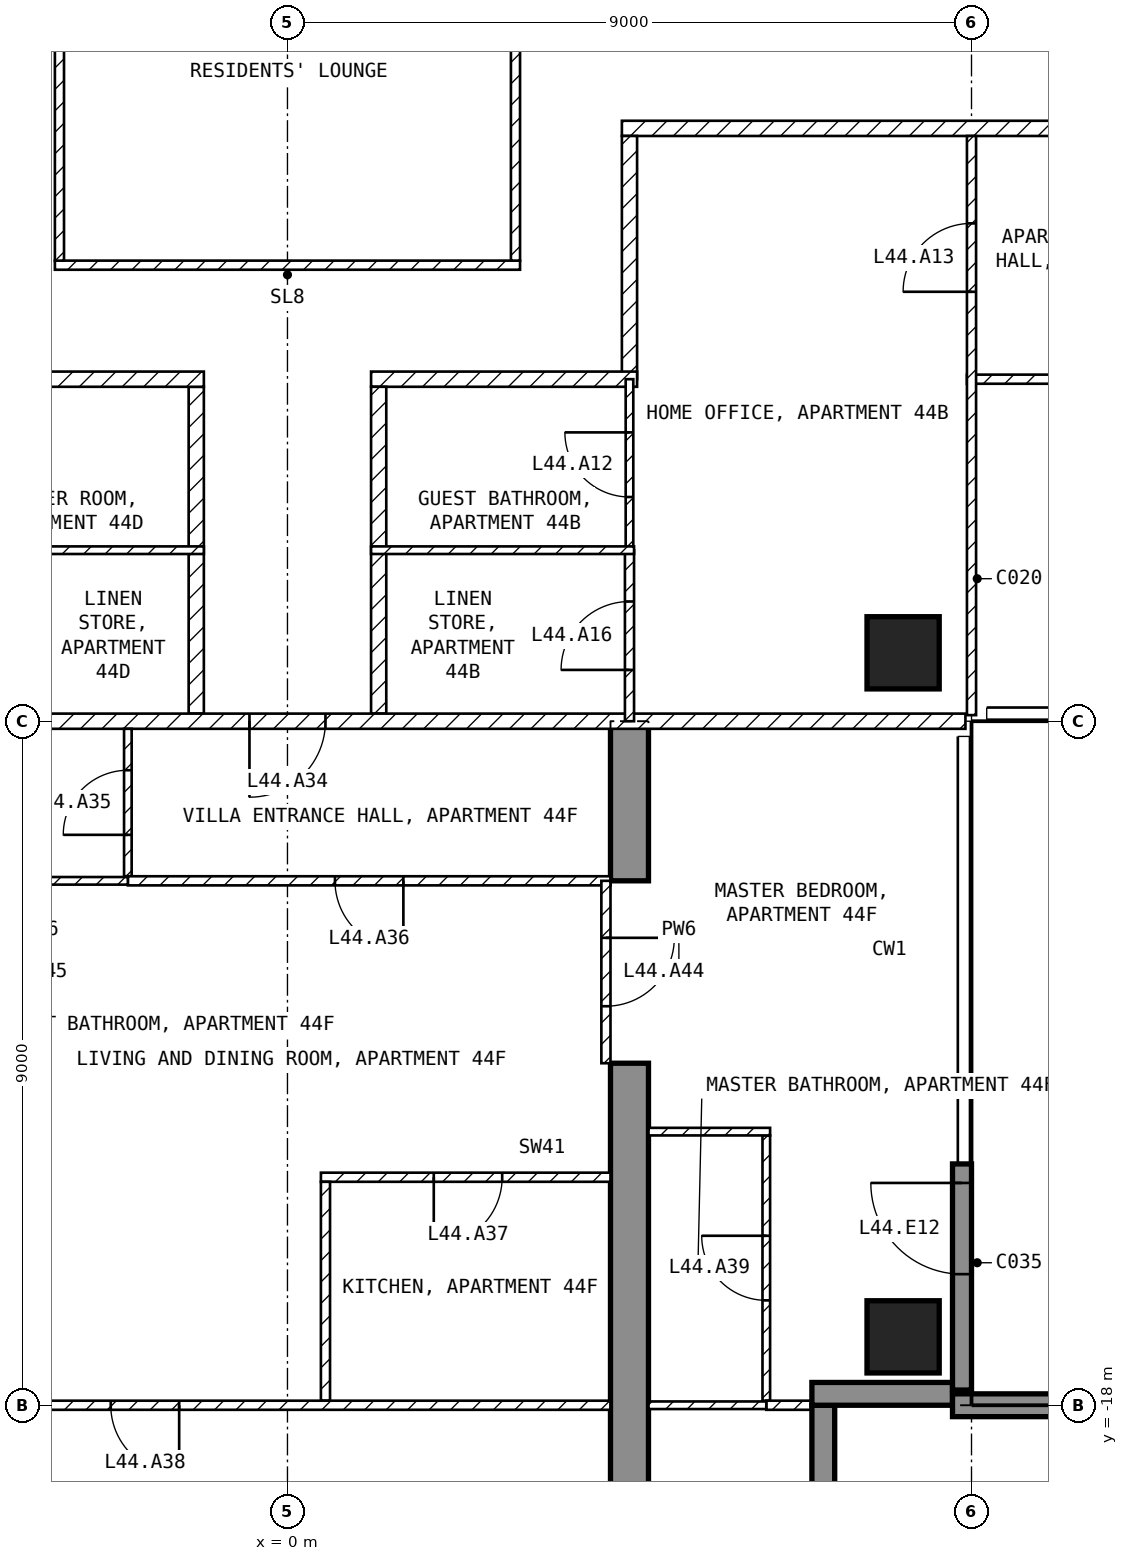
"""IFC4 building model, lengths in metres.
Left out: names, types, materials, properties, quantities, classifications, styles, units other than length and angle.
Written with IfcOpenShell. Run it as: python <this file> out.ifc"""

import sys

from ifc_helpers import new_model, si_unit, direction, frame, frame_2d, origin, origin_2d, place, context, subcontext, project, spatial, polyline, rectangle, outline, extrude, element, fill, save


model = new_model("IFC4")
c1 = context("Model", 3, precision=1e-05, world=origin(), true_north=direction((0.0, 1.0)))
c2 = subcontext(c1, "Body", "Model", "MODEL_VIEW")
j1 = project(units=[si_unit("LENGTHUNIT", "METRE"), si_unit("PLANEANGLEUNIT", "RADIAN")], contexts=[c1])
p1 = place(None, origin())
s1 = spatial("IfcSite", under=j1, at=p1, CompositionType="ELEMENT")
p2 = place(p1, origin())
s2 = spatial("IfcBuilding", under=s1, at=p2, CompositionType="ELEMENT")
p3 = place(p2, frame((0.0, 0.0, 180.6)))
s3 = spatial("IfcBuildingStorey", under=s2, at=p3, CompositionType="ELEMENT", Elevation=180.6)
for number, where, z_axis, x_axis in (
    (1, (8.1, -17.1, -0.25), (0.0, 0.0, 1.0), (1.0, 0.0, 0.0)),
    (2, (8.1, -8.1, -0.25), (0.0, 0.0, 1.0), (1.0, 0.0, 0.0)),
):
    element("IfcColumn", number, at=place(p3, frame(where, z_axis=z_axis, x_axis=x_axis)), inside=s3, PredefinedType="COLUMN", context=c2, shape_type="SweptSolid", body=[
        extrude(rectangle(XDim=0.95, YDim=0.95, at=origin_2d()), origin(), (0.0, 0.0, 1.0), 3.5),
    ])
p4 = place(p3, frame((4.25, -20.225, -0.25), z_axis=(1.0, 0.0, 0.0), x_axis=(0.0, 1.0, 0.0)))
e3 = element("IfcWall", 3, at=p4, inside=s3, PredefinedType="SHEAR", context=c2, shape_type="SweptSolid", body=[
    extrude(outline(polyline([(0.0, 0.0), (6.725, 0.0), (6.725, 2.65), (9.125, 2.65), (9.125, 0.0), (11.225, 0.0), (11.225, 3.5), (0.0, 3.5), (0.0, 0.0)])), origin(), (0.0, 0.0, 1.0), 0.5),
])
p5 = place(p3, frame((8.875, -17.8, 0.0), z_axis=(0.0, 0.0, 1.0), x_axis=(0.0, 1.0, 0.0)))
e4 = element("IfcWall", 4, at=p5, inside=s3, PredefinedType="SOLIDWALL", context=c2, shape_type="SweptSolid", body=[
    extrude(rectangle(XDim=2.975, YDim=0.25, at=frame_2d((1.488, 0.0))), origin(), (0.0, 0.0, 1.0), 3.25),
])
p6 = place(p5, frame((1.525, 0.0, 0.0)))
e5 = element("IfcOpeningElement", 5, at=p6, cuts=e4, PredefinedType="OPENING", context=c2, shape_type="SweptSolid", body=[
    extrude(rectangle(XDim=1.2, YDim=2.4, at=frame_2d((0.6, 1.2))), frame((0.0, 0.135, 0.0), z_axis=(0.0, -1.0, 0.0), x_axis=(1.0, 0.0, 0.0)), (0.0, 0.0, 1.0), 0.27),
])
p7 = place(p3, frame((7.05, -19.8, 0.0), z_axis=(0.0, 0.0, 1.0), x_axis=(0.0, 1.0, 0.0)))
e6 = element("IfcWall", 6, at=p7, inside=s3, PredefinedType="SOLIDWALL", context=c2, shape_type="SweptSolid", body=[
    extrude(rectangle(XDim=1.8, YDim=0.3, at=frame_2d((0.9, 0.0))), origin(), (0.0, 0.0, 1.0), 3.25),
])
p8 = place(p3, frame((6.9, -17.85, 0.0), z_axis=(0.0, 0.0, 1.0), x_axis=(1.0, 0.0, 0.0)))
e7 = element("IfcWall", 7, at=p8, inside=s3, PredefinedType="SOLIDWALL", context=c2, shape_type="SweptSolid", body=[
    extrude(rectangle(XDim=1.85, YDim=0.3, at=frame_2d((0.925, 0.0))), origin(), (0.0, 0.0, 1.0), 3.25),
])
p9 = place(p3, frame((8.75, -18.0, 0.0), z_axis=(0.0, 0.0, 1.0), x_axis=(1.0, 0.0, 0.0)))
e8 = element("IfcWall", 8, at=p9, inside=s3, PredefinedType="SOLIDWALL", context=c2, shape_type="SweptSolid", body=[
    extrude(rectangle(XDim=2.95, YDim=0.3, at=frame_2d((1.475, 0.0))), origin(), (0.0, 0.0, 1.0), 3.25),
])
p10 = place(p3, frame((-3.06, -3.0, 0.0), z_axis=(0.0, 0.0, 1.0), x_axis=(1.0, 0.0, 0.0)))
e9 = element("IfcWall", 9, at=p10, inside=s3, PredefinedType="PARTITIONING", context=c2, shape_type="SweptSolid", body=[
    extrude(rectangle(XDim=6.12, YDim=0.12, at=frame_2d((3.06, 0.0))), origin(), (0.0, 0.0, 1.0), 3.25),
])
for number, where, z_axis, x_axis in (
    (10, (3.0, -2.94, 0.0), (0.0, 0.0, 1.0), (0.0, 1.0, 0.0)),
    (11, (-3.0, 2.94, 0.0), (0.0, 0.0, 1.0), (0.0, -1.0, 0.0)),
):
    element("IfcWall", number, at=place(p3, frame(where, z_axis=z_axis, x_axis=x_axis)), inside=s3, PredefinedType="PARTITIONING", context=c2, shape_type="SweptSolid", body=[
        extrude(rectangle(XDim=5.88, YDim=0.12, at=frame_2d((2.94, 0.0))), origin(), (0.0, 0.0, 1.0), 3.25),
    ])
p11 = place(p3, frame((21.6, -1.2, 0.0), z_axis=(0.0, 0.0, 1.0), x_axis=(-1.0, 0.0, 0.0)))
e12 = element("IfcWall", 12, at=p11, inside=s3, PredefinedType="PARTITIONING", context=c2, shape_type="SweptSolid", body=[
    extrude(rectangle(XDim=17.2, YDim=0.2, at=frame_2d((8.6, 0.0))), origin(), (0.0, 0.0, 1.0), 3.25),
])
p12 = place(p11, frame((10.3, 0.0, 0.0)))
e13 = element("IfcOpeningElement", 13, at=p12, cuts=e12, PredefinedType="OPENING", context=c2, shape_type="SweptSolid", body=[
    extrude(rectangle(XDim=1.0, YDim=2.1, at=frame_2d((0.5, 1.05))), frame((0.0, 0.11, 0.0), z_axis=(0.0, -1.0, 0.0), x_axis=(1.0, 0.0, 0.0)), (0.0, 0.0, 1.0), 0.22),
])
p13 = place(p3, frame((4.5, -1.3, 0.0), z_axis=(0.0, 0.0, 1.0), x_axis=(0.0, -1.0, 0.0)))
e14 = element("IfcWall", 14, at=p13, inside=s3, PredefinedType="PARTITIONING", context=c2, shape_type="SweptSolid", body=[
    extrude(rectangle(XDim=3.2, YDim=0.2, at=frame_2d((1.6, 0.0))), origin(), (0.0, 0.0, 1.0), 3.25),
])
p14 = place(p3, frame((4.6, -4.5, 0.0), z_axis=(0.0, 0.0, 1.0), x_axis=(-1.0, 0.0, 0.0)))
e15 = element("IfcWall", 15, at=p14, inside=s3, PredefinedType="PARTITIONING", context=c2, shape_type="SweptSolid", body=[
    extrude(rectangle(XDim=3.5, YDim=0.2, at=frame_2d((1.75, 0.0))), origin(), (0.0, 0.0, 1.0), 3.25),
])
for number, where, z_axis, x_axis in (
    (16, (1.2, -4.6, 0.0), (0.0, 0.0, 1.0), (0.0, -1.0, 0.0)),
    (17, (-1.2, -8.9, 0.0), (0.0, 0.0, 1.0), (0.0, 1.0, 0.0)),
):
    element("IfcWall", number, at=place(p3, frame(where, z_axis=z_axis, x_axis=x_axis)), inside=s3, PredefinedType="PARTITIONING", context=c2, shape_type="SweptSolid", body=[
        extrude(rectangle(XDim=4.3, YDim=0.2, at=frame_2d((2.15, 0.0))), origin(), (0.0, 0.0, 1.0), 3.25),
    ])
p15 = place(p3, frame((-1.1, -4.5, 0.0), z_axis=(0.0, 0.0, 1.0), x_axis=(-1.0, 0.0, 0.0)))
e18 = element("IfcWall", 18, at=p15, inside=s3, PredefinedType="PARTITIONING", context=c2, shape_type="SweptSolid", body=[
    extrude(rectangle(XDim=3.5, YDim=0.2, at=frame_2d((1.75, 0.0))), origin(), (0.0, 0.0, 1.0), 3.25),
])
p16 = place(p3, frame((8.92, -9.0, 0.0), z_axis=(0.0, 0.0, 1.0), x_axis=(-1.0, 0.0, 0.0)))
e19 = element("IfcWall", 19, at=p16, inside=s3, PredefinedType="PARTITIONING", context=c2, shape_type="SweptSolid", body=[
    extrude(rectangle(XDim=17.84, YDim=0.2, at=frame_2d((8.92, 0.0))), origin(), (0.0, 0.0, 1.0), 3.25),
])
p17 = place(p16, frame((8.42, 0.0, 0.0)))
e20 = element("IfcOpeningElement", 20, at=p17, cuts=e19, PredefinedType="OPENING", context=c2, shape_type="SweptSolid", body=[
    extrude(rectangle(XDim=1.0, YDim=2.1, at=frame_2d((0.5, 1.05))), frame((0.0, 0.11, 0.0), z_axis=(0.0, -1.0, 0.0), x_axis=(1.0, 0.0, 0.0)), (0.0, 0.0, 1.0), 0.22),
])
p18 = place(p3, frame((17.4, -4.5, 0.0), z_axis=(0.0, 0.0, 1.0), x_axis=(-1.0, 0.0, 0.0)))
e21 = element("IfcWall", 21, at=p18, inside=s3, PredefinedType="PARTITIONING", context=c2, shape_type="SweptSolid", body=[
    extrude(rectangle(XDim=8.46, YDim=0.12, at=frame_2d((4.23, 0.0))), origin(), (0.0, 0.0, 1.0), 3.25),
])
p19 = place(p18, frame((0.45, 0.0, 0.0)))
e22 = element("IfcOpeningElement", 22, at=p19, cuts=e21, PredefinedType="OPENING", context=c2, shape_type="SweptSolid", body=[
    extrude(rectangle(XDim=0.9, YDim=2.1, at=frame_2d((0.45, 1.05))), frame((0.0, 0.07, 0.0), z_axis=(0.0, -1.0, 0.0), x_axis=(1.0, 0.0, 0.0)), (0.0, 0.0, 1.0), 0.14),
])
p20 = place(p18, frame((6.15, 0.0, 0.0)))
e23 = element("IfcOpeningElement", 23, at=p20, cuts=e21, PredefinedType="OPENING", context=c2, shape_type="SweptSolid", body=[
    extrude(rectangle(XDim=0.9, YDim=2.1, at=frame_2d((0.45, 1.05))), frame((0.0, 0.07, 0.0), z_axis=(0.0, -1.0, 0.0), x_axis=(1.0, 0.0, 0.0)), (0.0, 0.0, 1.0), 0.14),
])
p21 = place(p3, frame((9.0, -8.92, 0.0), z_axis=(0.0, 0.0, 1.0), x_axis=(0.0, 1.0, 0.0)))
e24 = element("IfcWall", 24, at=p21, inside=s3, PredefinedType="PARTITIONING", context=c2, shape_type="SweptSolid", body=[
    extrude(rectangle(XDim=7.62, YDim=0.12, at=frame_2d((3.81, 0.0))), origin(), (0.0, 0.0, 1.0), 3.25),
])
p22 = place(p21, frame((5.57, 0.0, 0.0)))
e25 = element("IfcOpeningElement", 25, at=p22, cuts=e24, PredefinedType="OPENING", context=c2, shape_type="SweptSolid", body=[
    extrude(rectangle(XDim=0.9, YDim=2.1, at=frame_2d((0.45, 1.05))), frame((0.0, 0.07, 0.0), z_axis=(0.0, -1.0, 0.0), x_axis=(1.0, 0.0, 0.0)), (0.0, 0.0, 1.0), 0.14),
])
p23 = place(p3, frame((4.5, -6.75, 0.0), z_axis=(0.0, 0.0, 1.0), x_axis=(0.0, 1.0, 0.0)))
e26 = element("IfcWall", 26, at=p23, inside=s3, PredefinedType="PARTITIONING", context=c2, shape_type="SweptSolid", body=[
    extrude(rectangle(XDim=2.25, YDim=0.1, at=frame_2d((1.125, 0.0))), origin(), (0.0, 0.0, 1.0), 3.25),
])
p24 = place(p23, frame((0.7, 0.0, 0.0)))
e27 = element("IfcOpeningElement", 27, at=p24, cuts=e26, PredefinedType="OPENING", context=c2, shape_type="SweptSolid", body=[
    extrude(rectangle(XDim=0.85, YDim=2.1, at=frame_2d((0.425, 1.05))), frame((0.0, 0.06, 0.0), z_axis=(0.0, -1.0, 0.0), x_axis=(1.0, 0.0, 0.0)), (0.0, 0.0, 1.0), 0.12),
])
p25 = place(p3, frame((4.5, -9.0, 0.0), z_axis=(0.0, 0.0, 1.0), x_axis=(0.0, 1.0, 0.0)))
e28 = element("IfcWall", 28, at=p25, inside=s3, PredefinedType="PARTITIONING", context=c2, shape_type="SweptSolid", body=[
    extrude(rectangle(XDim=2.25, YDim=0.12, at=frame_2d((1.125, 0.0))), origin(), (0.0, 0.0, 1.0), 3.25),
])
p26 = place(p25, frame((0.675, 0.0, 0.0)))
e29 = element("IfcOpeningElement", 29, at=p26, cuts=e28, PredefinedType="OPENING", context=c2, shape_type="SweptSolid", body=[
    extrude(rectangle(XDim=0.9, YDim=2.1, at=frame_2d((0.45, 1.05))), frame((0.0, 0.07, 0.0), z_axis=(0.0, -1.0, 0.0), x_axis=(1.0, 0.0, 0.0)), (0.0, 0.0, 1.0), 0.14),
])
for number, where, z_axis, x_axis in (
    (30, (4.56, -6.75, 0.0), (0.0, 0.0, 1.0), (-1.0, 0.0, 0.0)),
    (31, (-1.1, -6.75, 0.0), (0.0, 0.0, 1.0), (-1.0, 0.0, 0.0)),
):
    element("IfcWall", number, at=place(p3, frame(where, z_axis=z_axis, x_axis=x_axis)), inside=s3, PredefinedType="PARTITIONING", context=c2, shape_type="SweptSolid", body=[
        extrude(rectangle(XDim=3.46, YDim=0.1, at=frame_2d((1.73, 0.0))), origin(), (0.0, 0.0, 1.0), 3.25),
    ])
p27 = place(p3, frame((-2.1, -11.04, 0.0), z_axis=(0.0, 0.0, 1.0), x_axis=(0.0, 1.0, 0.0)))
e32 = element("IfcWall", 32, at=p27, inside=s3, PredefinedType="PARTITIONING", context=c2, shape_type="SweptSolid", body=[
    extrude(rectangle(XDim=1.94, YDim=0.1, at=frame_2d((0.97, 0.0))), origin(), (0.0, 0.0, 1.0), 3.25),
])
p28 = place(p27, frame((0.545, 0.0, 0.0)))
e33 = element("IfcOpeningElement", 33, at=p28, cuts=e32, PredefinedType="OPENING", context=c2, shape_type="SweptSolid", body=[
    extrude(rectangle(XDim=0.85, YDim=2.1, at=frame_2d((0.425, 1.05))), frame((0.0, 0.06, 0.0), z_axis=(0.0, -1.0, 0.0), x_axis=(1.0, 0.0, 0.0)), (0.0, 0.0, 1.0), 0.12),
])
p29 = place(p3, frame((4.25, -11.1, 0.0), z_axis=(0.0, 0.0, 1.0), x_axis=(-1.0, 0.0, 0.0)))
e34 = element("IfcWall", 34, at=p29, inside=s3, PredefinedType="PARTITIONING", context=c2, shape_type="SweptSolid", body=[
    extrude(rectangle(XDim=6.35, YDim=0.12, at=frame_2d((3.175, 0.0))), origin(), (0.0, 0.0, 1.0), 3.25),
])
p30 = place(p29, frame((2.725, 0.0, 0.0)))
e35 = element("IfcOpeningElement", 35, at=p30, cuts=e34, PredefinedType="OPENING", context=c2, shape_type="SweptSolid", body=[
    extrude(rectangle(XDim=0.9, YDim=2.1, at=frame_2d((0.45, 1.05))), frame((0.0, 0.07, 0.0), z_axis=(0.0, -1.0, 0.0), x_axis=(1.0, 0.0, 0.0)), (0.0, 0.0, 1.0), 0.14),
])
p31 = place(p3, frame((-2.1, -11.1, 0.0), z_axis=(0.0, 0.0, 1.0), x_axis=(-1.0, 0.0, 0.0)))
e36 = element("IfcWall", 36, at=p31, inside=s3, PredefinedType="PARTITIONING", context=c2, shape_type="SweptSolid", body=[
    extrude(rectangle(XDim=2.15, YDim=0.1, at=frame_2d((1.075, 0.0))), origin(), (0.0, 0.0, 1.0), 3.25),
])
p32 = place(p3, frame((4.25, -15.0, 0.0), z_axis=(0.0, 0.0, 1.0), x_axis=(-1.0, 0.0, 0.0)))
e37 = element("IfcWall", 37, at=p32, inside=s3, PredefinedType="PARTITIONING", context=c2, shape_type="SweptSolid", body=[
    extrude(rectangle(XDim=3.81, YDim=0.12, at=frame_2d((1.905, 0.0))), origin(), (0.0, 0.0, 1.0), 3.25),
])
p33 = place(p32, frame((1.425, 0.0, 0.0)))
e38 = element("IfcOpeningElement", 38, at=p33, cuts=e37, PredefinedType="OPENING", context=c2, shape_type="SweptSolid", body=[
    extrude(rectangle(XDim=0.9, YDim=2.1, at=frame_2d((0.45, 1.05))), frame((0.0, 0.07, 0.0), z_axis=(0.0, -1.0, 0.0), x_axis=(1.0, 0.0, 0.0)), (0.0, 0.0, 1.0), 0.14),
])
p34 = place(p3, frame((0.5, -15.06, 0.0), z_axis=(0.0, 0.0, 1.0), x_axis=(0.0, -1.0, 0.0)))
e39 = element("IfcWall", 39, at=p34, inside=s3, PredefinedType="PARTITIONING", context=c2, shape_type="SweptSolid", body=[
    extrude(rectangle(XDim=2.88, YDim=0.12, at=frame_2d((1.44, 0.0))), origin(), (0.0, 0.0, 1.0), 3.25),
])
p35 = place(p3, frame((4.25, -18.0, 0.0), z_axis=(0.0, 0.0, 1.0), x_axis=(-1.0, 0.0, 0.0)))
e40 = element("IfcWall", 40, at=p35, inside=s3, PredefinedType="PARTITIONING", context=c2, shape_type="SweptSolid", body=[
    extrude(rectangle(XDim=8.5, YDim=0.12, at=frame_2d((4.25, 0.0))), origin(), (0.0, 0.0, 1.0), 3.25),
])
p36 = place(p35, frame((5.675, 0.0, 0.0)))
e41 = element("IfcOpeningElement", 41, at=p36, cuts=e40, PredefinedType="OPENING", context=c2, shape_type="SweptSolid", body=[
    extrude(rectangle(XDim=0.9, YDim=2.1, at=frame_2d((0.45, 1.05))), frame((0.0, 0.07, 0.0), z_axis=(0.0, -1.0, 0.0), x_axis=(1.0, 0.0, 0.0)), (0.0, 0.0, 1.0), 0.14),
])
p37 = place(p3, frame((6.3, -17.94, 0.0), z_axis=(0.0, 0.0, 1.0), x_axis=(0.0, 1.0, 0.0)))
e42 = element("IfcWall", 42, at=p37, inside=s3, PredefinedType="PARTITIONING", context=c2, shape_type="SweptSolid", body=[
    extrude(rectangle(XDim=3.49, YDim=0.1, at=frame_2d((1.745, 0.0))), origin(), (0.0, 0.0, 1.0), 3.25),
])
p38 = place(p37, frame((1.32, 0.0, 0.0)))
e43 = element("IfcOpeningElement", 43, at=p38, cuts=e42, PredefinedType="OPENING", context=c2, shape_type="SweptSolid", body=[
    extrude(rectangle(XDim=0.85, YDim=2.1, at=frame_2d((0.425, 1.05))), frame((0.0, 0.06, 0.0), z_axis=(0.0, -1.0, 0.0), x_axis=(1.0, 0.0, 0.0)), (0.0, 0.0, 1.0), 0.12),
])
p39 = place(p3, frame((6.35, -14.4, 0.0), z_axis=(0.0, 0.0, 1.0), x_axis=(-1.0, 0.0, 0.0)))
e44 = element("IfcWall", 44, at=p39, inside=s3, PredefinedType="PARTITIONING", context=c2, shape_type="SweptSolid", body=[
    extrude(rectangle(XDim=1.6, YDim=0.1, at=frame_2d((0.8, 0.0))), origin(), (0.0, 0.0, 1.0), 3.25),
])
p40 = place(p3, frame((7.12, -18.0, 0.0), z_axis=(0.0, 0.0, 1.0), x_axis=(-1.0, 0.0, 0.0)))
e45 = element("IfcWall", 45, at=p40, inside=s3, PredefinedType="PARTITIONING", context=c2, shape_type="SweptSolid", body=[
    extrude(rectangle(XDim=0.82, YDim=0.12, at=frame_2d((0.41, 0.0))), origin(), (0.0, 0.0, 1.0), 3.25),
])
p41 = place(p3, frame((6.3, -18.0, 0.0), z_axis=(0.0, 0.0, 1.0), x_axis=(-1.0, 0.0, 0.0)))
e46 = element("IfcWall", 46, at=p41, inside=s3, PredefinedType="PARTITIONING", context=c2, shape_type="SweptSolid", body=[
    extrude(rectangle(XDim=1.55, YDim=0.1, at=frame_2d((0.775, 0.0))), origin(), (0.0, 0.0, 1.0), 3.25),
])
p42 = place(p3, frame((4.19, -11.1, 0.0), z_axis=(0.0, 0.0, 1.0), x_axis=(0.0, -1.0, 0.0)))
e47 = element("IfcWall", 47, at=p42, inside=s3, PredefinedType="PARTITIONING", context=c2, shape_type="SweptSolid", body=[
    extrude(rectangle(XDim=2.4, YDim=0.12, at=frame_2d((1.2, 0.0))), origin(), (0.0, 0.0, 1.0), 2.4),
])
p43 = place(p42, frame((0.75, 0.0, 0.0)))
e48 = element("IfcOpeningElement", 48, at=p43, cuts=e47, PredefinedType="OPENING", context=c2, shape_type="SweptSolid", body=[
    extrude(rectangle(XDim=0.9, YDim=2.1, at=frame_2d((0.45, 1.05))), frame((0.0, 0.07, 0.0), z_axis=(0.0, -1.0, 0.0), x_axis=(1.0, 0.0, 0.0)), (0.0, 0.0, 1.0), 0.14),
])
p44 = place(p6, origin())
e49 = element("IfcDoor", 49, at=p44, inside=s3, OperationType="SINGLE_SWING_RIGHT", PredefinedType="DOOR", context=c2, shape_type="SweptSolid", body=[
    extrude(rectangle(XDim=1.2, YDim=2.4, at=frame_2d((0.6, 1.2))), frame((0.0, 0.025, 0.0), z_axis=(0.0, -1.0, 0.0), x_axis=(1.0, 0.0, 0.0)), (0.0, 0.0, 1.0), 0.05),
])
fill(e5, e49)
p45 = place(p24, origin())
e50 = element("IfcDoor", 50, at=p45, inside=s3, OperationType="SINGLE_SWING_RIGHT", PredefinedType="DOOR", context=c2, shape_type="SweptSolid", body=[
    extrude(rectangle(XDim=0.85, YDim=2.1, at=frame_2d((0.425, 1.05))), frame((0.0, 0.025, 0.0), z_axis=(0.0, -1.0, 0.0), x_axis=(1.0, 0.0, 0.0)), (0.0, 0.0, 1.0), 0.05),
])
fill(e27, e50)
p46 = place(p22, origin())
e51 = element("IfcDoor", 51, at=p46, inside=s3, OperationType="SINGLE_SWING_LEFT", PredefinedType="DOOR", context=c2, shape_type="SweptSolid", body=[
    extrude(rectangle(XDim=0.9, YDim=2.1, at=frame_2d((0.45, 1.05))), frame((0.0, 0.025, 0.0), z_axis=(0.0, -1.0, 0.0), x_axis=(1.0, 0.0, 0.0)), (0.0, 0.0, 1.0), 0.05),
])
fill(e25, e51)
p47 = place(p26, origin())
e52 = element("IfcDoor", 52, at=p47, inside=s3, OperationType="SINGLE_SWING_LEFT", PredefinedType="DOOR", context=c2, shape_type="SweptSolid", body=[
    extrude(rectangle(XDim=0.9, YDim=2.1, at=frame_2d((0.45, 1.05))), frame((0.0, 0.025, 0.0), z_axis=(0.0, -1.0, 0.0), x_axis=(1.0, 0.0, 0.0)), (0.0, 0.0, 1.0), 0.05),
])
fill(e29, e52)
p48 = place(p17, origin())
e53 = element("IfcDoor", 53, at=p48, inside=s3, OperationType="SINGLE_SWING_RIGHT", PredefinedType="DOOR", context=c2, shape_type="SweptSolid", body=[
    extrude(rectangle(XDim=1.0, YDim=2.1, at=frame_2d((0.5, 1.05))), frame((0.0, 0.025, 0.0), z_axis=(0.0, -1.0, 0.0), x_axis=(1.0, 0.0, 0.0)), (0.0, 0.0, 1.0), 0.05),
])
fill(e20, e53)
p49 = place(p28, origin())
e54 = element("IfcDoor", 54, at=p49, inside=s3, OperationType="SINGLE_SWING_LEFT", PredefinedType="DOOR", context=c2, shape_type="SweptSolid", body=[
    extrude(rectangle(XDim=0.85, YDim=2.1, at=frame_2d((0.425, 1.05))), frame((0.0, 0.025, 0.0), z_axis=(0.0, -1.0, 0.0), x_axis=(1.0, 0.0, 0.0)), (0.0, 0.0, 1.0), 0.05),
])
fill(e33, e54)
p50 = place(p30, origin())
e55 = element("IfcDoor", 55, at=p50, inside=s3, OperationType="SINGLE_SWING_LEFT", PredefinedType="DOOR", context=c2, shape_type="SweptSolid", body=[
    extrude(rectangle(XDim=0.9, YDim=2.1, at=frame_2d((0.45, 1.05))), frame((0.0, 0.025, 0.0), z_axis=(0.0, -1.0, 0.0), x_axis=(1.0, 0.0, 0.0)), (0.0, 0.0, 1.0), 0.05),
])
fill(e35, e55)
p51 = place(p33, origin())
e56 = element("IfcDoor", 56, at=p51, inside=s3, OperationType="SINGLE_SWING_RIGHT", PredefinedType="DOOR", context=c2, shape_type="SweptSolid", body=[
    extrude(rectangle(XDim=0.9, YDim=2.1, at=frame_2d((0.45, 1.05))), frame((0.0, 0.025, 0.0), z_axis=(0.0, -1.0, 0.0), x_axis=(1.0, 0.0, 0.0)), (0.0, 0.0, 1.0), 0.05),
])
fill(e38, e56)
p52 = place(p36, origin())
e57 = element("IfcDoor", 57, at=p52, inside=s3, OperationType="SINGLE_SWING_LEFT", PredefinedType="DOOR", context=c2, shape_type="SweptSolid", body=[
    extrude(rectangle(XDim=0.9, YDim=2.1, at=frame_2d((0.45, 1.05))), frame((0.0, 0.025, 0.0), z_axis=(0.0, -1.0, 0.0), x_axis=(1.0, 0.0, 0.0)), (0.0, 0.0, 1.0), 0.05),
])
fill(e41, e57)
p53 = place(p38, origin())
e58 = element("IfcDoor", 58, at=p53, inside=s3, OperationType="SINGLE_SWING_RIGHT", PredefinedType="DOOR", context=c2, shape_type="SweptSolid", body=[
    extrude(rectangle(XDim=0.85, YDim=2.1, at=frame_2d((0.425, 1.05))), frame((0.0, 0.025, 0.0), z_axis=(0.0, -1.0, 0.0), x_axis=(1.0, 0.0, 0.0)), (0.0, 0.0, 1.0), 0.05),
])
fill(e43, e58)
p54 = place(p43, origin())
e59 = element("IfcDoor", 59, at=p54, inside=s3, OperationType="SINGLE_SWING_LEFT", PredefinedType="DOOR", context=c2, shape_type="SweptSolid", body=[
    extrude(rectangle(XDim=0.9, YDim=2.1, at=frame_2d((0.45, 1.05))), frame((0.0, 0.025, 0.0), z_axis=(0.0, -1.0, 0.0), x_axis=(1.0, 0.0, 0.0)), (0.0, 0.0, 1.0), 0.05),
])
fill(e48, e59)
save(model, sys.argv[1])
